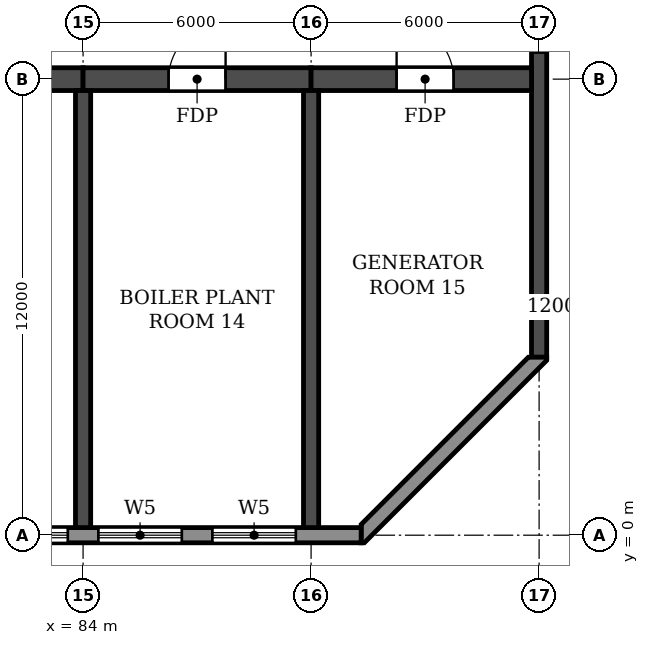
"""IFC4 building model, lengths in metres.
Left out: names, types, materials, properties, quantities, classifications, styles, units other than length and angle.
Written with IfcOpenShell. Run it as: python <this file> out.ifc"""

import sys

from ifc_helpers import new_model, si_unit, direction, frame, frame_2d, origin, place, context, subcontext, project, spatial, polyline, rectangle, outline, extrude, element, fill, save


model = new_model("IFC4")
c1 = context("Model", 3, precision=1e-05, world=origin(), true_north=direction((0.0, 1.0)))
c2 = subcontext(c1, "Body", "Model", "MODEL_VIEW")
j1 = project(units=[si_unit("LENGTHUNIT", "METRE"), si_unit("PLANEANGLEUNIT", "RADIAN")], contexts=[c1])
p1 = place(None, origin())
s1 = spatial("IfcSite", under=j1, at=p1, CompositionType="ELEMENT")
p2 = place(p1, origin())
s2 = spatial("IfcBuilding", under=s1, at=p2, CompositionType="ELEMENT")
p3 = place(p2, frame((0.0, 0.0, 66.3)))
s3 = spatial("IfcBuildingStorey", under=s2, at=p3, CompositionType="ELEMENT", Elevation=66.3)
for number, where, z_axis, x_axis in (
    (1, (84.0, 0.2, 0.0), (0.0, 0.0, 1.0), (0.0, 1.0, 0.0)),
    (2, (90.0, 0.2, 0.0), (0.0, 0.0, 1.0), (0.0, 1.0, 0.0)),
):
    element("IfcWall", number, at=place(p3, frame(where, z_axis=z_axis, x_axis=x_axis)), inside=s3, PredefinedType="SHEAR", context=c2, shape_type="SweptSolid", body=[
        extrude(rectangle(XDim=11.5, YDim=0.4, at=frame_2d((5.75, 0.0))), origin(), (0.0, 0.0, 1.0), 6.36),
    ])
p4 = place(p3, frame((96.0, 4.683, 0.0), z_axis=(0.0, 0.0, 1.0), x_axis=(0.0, 1.0, 0.0)))
e3 = element("IfcWall", 3, at=p4, inside=s3, PredefinedType="SHEAR", context=c2, shape_type="SweptSolid", body=[
    extrude(rectangle(XDim=35.434, YDim=0.4, at=frame_2d((17.717, 0.0))), origin(), (0.0, 0.0, 1.0), 6.36),
])
p5 = place(p4, frame((23.817, 0.0, 0.9)))
e4 = element("IfcOpeningElement", 4, at=p5, cuts=e3, PredefinedType="OPENING", context=c2, shape_type="SweptSolid", body=[
    extrude(rectangle(XDim=1.2, YDim=1.5, at=frame_2d((0.6, 0.75))), frame((0.0, 0.21, 0.0), z_axis=(0.0, -1.0, 0.0), x_axis=(1.0, 0.0, 0.0)), (0.0, 0.0, 1.0), 0.42),
])
p6 = place(p4, frame((8.017, 0.0, 0.9)))
e5 = element("IfcOpeningElement", 5, at=p6, cuts=e3, PredefinedType="OPENING", context=c2, shape_type="SweptSolid", body=[
    extrude(rectangle(XDim=1.2, YDim=1.5, at=frame_2d((0.6, 0.75))), frame((0.0, 0.21, 0.0), z_axis=(0.0, -1.0, 0.0), x_axis=(1.0, 0.0, 0.0)), (0.0, 0.0, 1.0), 0.42),
])
p7 = place(p4, frame((13.317, 0.0, 0.9)))
e6 = element("IfcOpeningElement", 6, at=p7, cuts=e3, PredefinedType="OPENING", context=c2, shape_type="SweptSolid", body=[
    extrude(rectangle(XDim=1.2, YDim=1.5, at=frame_2d((0.6, 0.75))), frame((0.0, 0.21, 0.0), z_axis=(0.0, -1.0, 0.0), x_axis=(1.0, 0.0, 0.0)), (0.0, 0.0, 1.0), 0.42),
])
p8 = place(p3, frame((78.0, 12.0, 0.0), z_axis=(0.0, 0.0, 1.0), x_axis=(1.0, 0.0, 0.0)))
e7 = element("IfcWall", 7, at=p8, inside=s3, PredefinedType="SHEAR", context=c2, shape_type="SweptSolid", body=[
    extrude(rectangle(XDim=6.0, YDim=0.6, at=frame_2d((3.0, 0.0))), origin(), (0.0, 0.0, 1.0), 6.36),
])
p9 = place(p8, frame((2.25, 0.0, 0.0)))
e8 = element("IfcOpeningElement", 8, at=p9, cuts=e7, PredefinedType="OPENING", context=c2, shape_type="SweptSolid", body=[
    extrude(rectangle(XDim=1.5, YDim=2.1, at=frame_2d((0.75, 1.05))), frame((0.0, 0.31, 0.0), z_axis=(0.0, -1.0, 0.0), x_axis=(1.0, 0.0, 0.0)), (0.0, 0.0, 1.0), 0.62),
])
p10 = place(p3, frame((84.0, 12.0, 0.0), z_axis=(0.0, 0.0, 1.0), x_axis=(1.0, 0.0, 0.0)))
e9 = element("IfcWall", 9, at=p10, inside=s3, PredefinedType="SHEAR", context=c2, shape_type="SweptSolid", body=[
    extrude(rectangle(XDim=6.0, YDim=0.6, at=frame_2d((3.0, 0.0))), origin(), (0.0, 0.0, 1.0), 6.36),
])
p11 = place(p10, frame((2.25, 0.0, 0.0)))
e10 = element("IfcOpeningElement", 10, at=p11, cuts=e9, PredefinedType="OPENING", context=c2, shape_type="SweptSolid", body=[
    extrude(rectangle(XDim=1.5, YDim=2.1, at=frame_2d((0.75, 1.05))), frame((0.0, 0.31, 0.0), z_axis=(0.0, -1.0, 0.0), x_axis=(1.0, 0.0, 0.0)), (0.0, 0.0, 1.0), 0.62),
])
p12 = place(p3, frame((90.0, 12.0, 0.0), z_axis=(0.0, 0.0, 1.0), x_axis=(1.0, 0.0, 0.0)))
e11 = element("IfcWall", 11, at=p12, inside=s3, PredefinedType="SHEAR", context=c2, shape_type="SweptSolid", body=[
    extrude(rectangle(XDim=5.8, YDim=0.6, at=frame_2d((2.9, 0.0))), origin(), (0.0, 0.0, 1.0), 6.36),
])
p13 = place(p12, frame((2.25, 0.0, 0.0)))
e12 = element("IfcOpeningElement", 12, at=p13, cuts=e11, PredefinedType="OPENING", context=c2, shape_type="SweptSolid", body=[
    extrude(rectangle(XDim=1.5, YDim=2.1, at=frame_2d((0.75, 1.05))), frame((0.0, 0.31, 0.0), z_axis=(0.0, -1.0, 0.0), x_axis=(1.0, 0.0, 0.0)), (0.0, 0.0, 1.0), 0.62),
])
p14 = place(p3, frame((10.683, 0.0, 0.0), z_axis=(0.0, 0.0, 1.0), x_axis=(1.0, 0.0, 0.0)))
e13 = element("IfcWall", 13, at=p14, inside=s3, PredefinedType="STANDARD", context=c2, shape_type="SweptSolid", body=[
    extrude(rectangle(XDim=80.634, YDim=0.4, at=frame_2d((40.317, 0.0))), origin(), (0.0, 0.0, 1.0), 6.36),
])
p15 = place(p14, frame((1.717, 0.0, 0.6)))
e14 = element("IfcOpeningElement", 14, at=p15, cuts=e13, PredefinedType="OPENING", context=c2, shape_type="SweptSolid", body=[
    extrude(rectangle(XDim=2.2, YDim=2.4, at=frame_2d((1.1, 1.2))), frame((0.0, 0.21, 0.0), z_axis=(0.0, -1.0, 0.0), x_axis=(1.0, 0.0, 0.0)), (0.0, 0.0, 1.0), 0.42),
])
p16 = place(p14, frame((4.717, 0.0, 0.6)))
e15 = element("IfcOpeningElement", 15, at=p16, cuts=e13, PredefinedType="OPENING", context=c2, shape_type="SweptSolid", body=[
    extrude(rectangle(XDim=2.2, YDim=2.4, at=frame_2d((1.1, 1.2))), frame((0.0, 0.21, 0.0), z_axis=(0.0, -1.0, 0.0), x_axis=(1.0, 0.0, 0.0)), (0.0, 0.0, 1.0), 0.42),
])
p17 = place(p14, frame((7.717, 0.0, 0.6)))
e16 = element("IfcOpeningElement", 16, at=p17, cuts=e13, PredefinedType="OPENING", context=c2, shape_type="SweptSolid", body=[
    extrude(rectangle(XDim=2.2, YDim=2.4, at=frame_2d((1.1, 1.2))), frame((0.0, 0.21, 0.0), z_axis=(0.0, -1.0, 0.0), x_axis=(1.0, 0.0, 0.0)), (0.0, 0.0, 1.0), 0.42),
])
p18 = place(p14, frame((10.717, 0.0, 0.6)))
e17 = element("IfcOpeningElement", 17, at=p18, cuts=e13, PredefinedType="OPENING", context=c2, shape_type="SweptSolid", body=[
    extrude(rectangle(XDim=2.2, YDim=2.4, at=frame_2d((1.1, 1.2))), frame((0.0, 0.21, 0.0), z_axis=(0.0, -1.0, 0.0), x_axis=(1.0, 0.0, 0.0)), (0.0, 0.0, 1.0), 0.42),
])
p19 = place(p14, frame((13.717, 0.0, 0.6)))
e18 = element("IfcOpeningElement", 18, at=p19, cuts=e13, PredefinedType="OPENING", context=c2, shape_type="SweptSolid", body=[
    extrude(rectangle(XDim=2.2, YDim=2.4, at=frame_2d((1.1, 1.2))), frame((0.0, 0.21, 0.0), z_axis=(0.0, -1.0, 0.0), x_axis=(1.0, 0.0, 0.0)), (0.0, 0.0, 1.0), 0.42),
])
p20 = place(p14, frame((16.717, 0.0, 0.6)))
e19 = element("IfcOpeningElement", 19, at=p20, cuts=e13, PredefinedType="OPENING", context=c2, shape_type="SweptSolid", body=[
    extrude(rectangle(XDim=2.2, YDim=2.4, at=frame_2d((1.1, 1.2))), frame((0.0, 0.21, 0.0), z_axis=(0.0, -1.0, 0.0), x_axis=(1.0, 0.0, 0.0)), (0.0, 0.0, 1.0), 0.42),
])
p21 = place(p14, frame((19.717, 0.0, 0.6)))
e20 = element("IfcOpeningElement", 20, at=p21, cuts=e13, PredefinedType="OPENING", context=c2, shape_type="SweptSolid", body=[
    extrude(rectangle(XDim=2.2, YDim=2.4, at=frame_2d((1.1, 1.2))), frame((0.0, 0.21, 0.0), z_axis=(0.0, -1.0, 0.0), x_axis=(1.0, 0.0, 0.0)), (0.0, 0.0, 1.0), 0.42),
])
p22 = place(p14, frame((22.717, 0.0, 0.6)))
e21 = element("IfcOpeningElement", 21, at=p22, cuts=e13, PredefinedType="OPENING", context=c2, shape_type="SweptSolid", body=[
    extrude(rectangle(XDim=2.2, YDim=2.4, at=frame_2d((1.1, 1.2))), frame((0.0, 0.21, 0.0), z_axis=(0.0, -1.0, 0.0), x_axis=(1.0, 0.0, 0.0)), (0.0, 0.0, 1.0), 0.42),
])
p23 = place(p14, frame((25.717, 0.0, 0.6)))
e22 = element("IfcOpeningElement", 22, at=p23, cuts=e13, PredefinedType="OPENING", context=c2, shape_type="SweptSolid", body=[
    extrude(rectangle(XDim=2.2, YDim=2.4, at=frame_2d((1.1, 1.2))), frame((0.0, 0.21, 0.0), z_axis=(0.0, -1.0, 0.0), x_axis=(1.0, 0.0, 0.0)), (0.0, 0.0, 1.0), 0.42),
])
p24 = place(p14, frame((28.717, 0.0, 0.6)))
e23 = element("IfcOpeningElement", 23, at=p24, cuts=e13, PredefinedType="OPENING", context=c2, shape_type="SweptSolid", body=[
    extrude(rectangle(XDim=2.2, YDim=2.4, at=frame_2d((1.1, 1.2))), frame((0.0, 0.21, 0.0), z_axis=(0.0, -1.0, 0.0), x_axis=(1.0, 0.0, 0.0)), (0.0, 0.0, 1.0), 0.42),
])
p25 = place(p14, frame((31.717, 0.0, 0.6)))
e24 = element("IfcOpeningElement", 24, at=p25, cuts=e13, PredefinedType="OPENING", context=c2, shape_type="SweptSolid", body=[
    extrude(rectangle(XDim=2.2, YDim=2.4, at=frame_2d((1.1, 1.2))), frame((0.0, 0.21, 0.0), z_axis=(0.0, -1.0, 0.0), x_axis=(1.0, 0.0, 0.0)), (0.0, 0.0, 1.0), 0.42),
])
p26 = place(p14, frame((34.717, 0.0, 0.6)))
e25 = element("IfcOpeningElement", 25, at=p26, cuts=e13, PredefinedType="OPENING", context=c2, shape_type="SweptSolid", body=[
    extrude(rectangle(XDim=2.2, YDim=2.4, at=frame_2d((1.1, 1.2))), frame((0.0, 0.21, 0.0), z_axis=(0.0, -1.0, 0.0), x_axis=(1.0, 0.0, 0.0)), (0.0, 0.0, 1.0), 0.42),
])
p27 = place(p14, frame((37.717, 0.0, 0.6)))
e26 = element("IfcOpeningElement", 26, at=p27, cuts=e13, PredefinedType="OPENING", context=c2, shape_type="SweptSolid", body=[
    extrude(rectangle(XDim=2.2, YDim=2.4, at=frame_2d((1.1, 1.2))), frame((0.0, 0.21, 0.0), z_axis=(0.0, -1.0, 0.0), x_axis=(1.0, 0.0, 0.0)), (0.0, 0.0, 1.0), 0.42),
])
p28 = place(p14, frame((40.717, 0.0, 0.6)))
e27 = element("IfcOpeningElement", 27, at=p28, cuts=e13, PredefinedType="OPENING", context=c2, shape_type="SweptSolid", body=[
    extrude(rectangle(XDim=2.2, YDim=2.4, at=frame_2d((1.1, 1.2))), frame((0.0, 0.21, 0.0), z_axis=(0.0, -1.0, 0.0), x_axis=(1.0, 0.0, 0.0)), (0.0, 0.0, 1.0), 0.42),
])
p29 = place(p14, frame((43.717, 0.0, 0.6)))
e28 = element("IfcOpeningElement", 28, at=p29, cuts=e13, PredefinedType="OPENING", context=c2, shape_type="SweptSolid", body=[
    extrude(rectangle(XDim=2.2, YDim=2.4, at=frame_2d((1.1, 1.2))), frame((0.0, 0.21, 0.0), z_axis=(0.0, -1.0, 0.0), x_axis=(1.0, 0.0, 0.0)), (0.0, 0.0, 1.0), 0.42),
])
p30 = place(p14, frame((46.717, 0.0, 0.6)))
e29 = element("IfcOpeningElement", 29, at=p30, cuts=e13, PredefinedType="OPENING", context=c2, shape_type="SweptSolid", body=[
    extrude(rectangle(XDim=2.2, YDim=2.4, at=frame_2d((1.1, 1.2))), frame((0.0, 0.21, 0.0), z_axis=(0.0, -1.0, 0.0), x_axis=(1.0, 0.0, 0.0)), (0.0, 0.0, 1.0), 0.42),
])
p31 = place(p14, frame((49.717, 0.0, 0.6)))
e30 = element("IfcOpeningElement", 30, at=p31, cuts=e13, PredefinedType="OPENING", context=c2, shape_type="SweptSolid", body=[
    extrude(rectangle(XDim=2.2, YDim=2.4, at=frame_2d((1.1, 1.2))), frame((0.0, 0.21, 0.0), z_axis=(0.0, -1.0, 0.0), x_axis=(1.0, 0.0, 0.0)), (0.0, 0.0, 1.0), 0.42),
])
p32 = place(p14, frame((52.717, 0.0, 0.6)))
e31 = element("IfcOpeningElement", 31, at=p32, cuts=e13, PredefinedType="OPENING", context=c2, shape_type="SweptSolid", body=[
    extrude(rectangle(XDim=2.2, YDim=2.4, at=frame_2d((1.1, 1.2))), frame((0.0, 0.21, 0.0), z_axis=(0.0, -1.0, 0.0), x_axis=(1.0, 0.0, 0.0)), (0.0, 0.0, 1.0), 0.42),
])
p33 = place(p14, frame((55.717, 0.0, 0.6)))
e32 = element("IfcOpeningElement", 32, at=p33, cuts=e13, PredefinedType="OPENING", context=c2, shape_type="SweptSolid", body=[
    extrude(rectangle(XDim=2.2, YDim=2.4, at=frame_2d((1.1, 1.2))), frame((0.0, 0.21, 0.0), z_axis=(0.0, -1.0, 0.0), x_axis=(1.0, 0.0, 0.0)), (0.0, 0.0, 1.0), 0.42),
])
p34 = place(p14, frame((58.717, 0.0, 0.6)))
e33 = element("IfcOpeningElement", 33, at=p34, cuts=e13, PredefinedType="OPENING", context=c2, shape_type="SweptSolid", body=[
    extrude(rectangle(XDim=2.2, YDim=2.4, at=frame_2d((1.1, 1.2))), frame((0.0, 0.21, 0.0), z_axis=(0.0, -1.0, 0.0), x_axis=(1.0, 0.0, 0.0)), (0.0, 0.0, 1.0), 0.42),
])
p35 = place(p14, frame((61.717, 0.0, 0.6)))
e34 = element("IfcOpeningElement", 34, at=p35, cuts=e13, PredefinedType="OPENING", context=c2, shape_type="SweptSolid", body=[
    extrude(rectangle(XDim=2.2, YDim=2.4, at=frame_2d((1.1, 1.2))), frame((0.0, 0.21, 0.0), z_axis=(0.0, -1.0, 0.0), x_axis=(1.0, 0.0, 0.0)), (0.0, 0.0, 1.0), 0.42),
])
p36 = place(p14, frame((64.717, 0.0, 0.6)))
e35 = element("IfcOpeningElement", 35, at=p36, cuts=e13, PredefinedType="OPENING", context=c2, shape_type="SweptSolid", body=[
    extrude(rectangle(XDim=2.2, YDim=2.4, at=frame_2d((1.1, 1.2))), frame((0.0, 0.21, 0.0), z_axis=(0.0, -1.0, 0.0), x_axis=(1.0, 0.0, 0.0)), (0.0, 0.0, 1.0), 0.42),
])
p37 = place(p14, frame((67.717, 0.0, 0.6)))
e36 = element("IfcOpeningElement", 36, at=p37, cuts=e13, PredefinedType="OPENING", context=c2, shape_type="SweptSolid", body=[
    extrude(rectangle(XDim=2.2, YDim=2.4, at=frame_2d((1.1, 1.2))), frame((0.0, 0.21, 0.0), z_axis=(0.0, -1.0, 0.0), x_axis=(1.0, 0.0, 0.0)), (0.0, 0.0, 1.0), 0.42),
])
p38 = place(p14, frame((70.717, 0.0, 0.6)))
e37 = element("IfcOpeningElement", 37, at=p38, cuts=e13, PredefinedType="OPENING", context=c2, shape_type="SweptSolid", body=[
    extrude(rectangle(XDim=2.2, YDim=2.4, at=frame_2d((1.1, 1.2))), frame((0.0, 0.21, 0.0), z_axis=(0.0, -1.0, 0.0), x_axis=(1.0, 0.0, 0.0)), (0.0, 0.0, 1.0), 0.42),
])
p39 = place(p14, frame((73.717, 0.0, 0.6)))
e38 = element("IfcOpeningElement", 38, at=p39, cuts=e13, PredefinedType="OPENING", context=c2, shape_type="SweptSolid", body=[
    extrude(rectangle(XDim=2.2, YDim=2.4, at=frame_2d((1.1, 1.2))), frame((0.0, 0.21, 0.0), z_axis=(0.0, -1.0, 0.0), x_axis=(1.0, 0.0, 0.0)), (0.0, 0.0, 1.0), 0.42),
])
p40 = place(p14, frame((76.717, 0.0, 0.6)))
e39 = element("IfcOpeningElement", 39, at=p40, cuts=e13, PredefinedType="OPENING", context=c2, shape_type="SweptSolid", body=[
    extrude(rectangle(XDim=2.2, YDim=2.4, at=frame_2d((1.1, 1.2))), frame((0.0, 0.21, 0.0), z_axis=(0.0, -1.0, 0.0), x_axis=(1.0, 0.0, 0.0)), (0.0, 0.0, 1.0), 0.42),
])
p41 = place(p3, origin())
e40 = element("IfcWall", 40, at=p41, inside=s3, PredefinedType="STANDARD", context=c2, shape_type="SweptSolid", body=[
    extrude(outline(polyline([(91.317, -0.2), (91.4, -0.2), (96.2, 4.6), (96.2, 4.683), (95.717, 4.683), (91.317, 0.283), (91.317, -0.2)])), origin(), (0.0, 0.0, 1.0), 6.36),
])
p42 = place(p38, origin())
e41 = element("IfcWindow", 41, at=p42, inside=s3, PartitioningType="TRIPLE_PANEL_HORIZONTAL", PredefinedType="WINDOW", context=c2, shape_type="SweptSolid", body=[
    extrude(rectangle(XDim=2.2, YDim=2.4, at=frame_2d((1.1, 1.2))), frame((0.0, 0.03, 0.0), z_axis=(0.0, -1.0, 0.0), x_axis=(1.0, 0.0, 0.0)), (0.0, 0.0, 1.0), 0.06),
])
fill(e37, e41)
p43 = place(p39, origin())
e42 = element("IfcWindow", 42, at=p43, inside=s3, PartitioningType="TRIPLE_PANEL_HORIZONTAL", PredefinedType="WINDOW", context=c2, shape_type="SweptSolid", body=[
    extrude(rectangle(XDim=2.2, YDim=2.4, at=frame_2d((1.1, 1.2))), frame((0.0, 0.03, 0.0), z_axis=(0.0, -1.0, 0.0), x_axis=(1.0, 0.0, 0.0)), (0.0, 0.0, 1.0), 0.06),
])
fill(e38, e42)
p44 = place(p40, origin())
e43 = element("IfcWindow", 43, at=p44, inside=s3, PartitioningType="TRIPLE_PANEL_HORIZONTAL", PredefinedType="WINDOW", context=c2, shape_type="SweptSolid", body=[
    extrude(rectangle(XDim=2.2, YDim=2.4, at=frame_2d((1.1, 1.2))), frame((0.0, 0.03, 0.0), z_axis=(0.0, -1.0, 0.0), x_axis=(1.0, 0.0, 0.0)), (0.0, 0.0, 1.0), 0.06),
])
fill(e39, e43)
p45 = place(p11, origin())
e44 = element("IfcDoor", 44, at=p45, inside=s3, OperationType="DOUBLE_DOOR_SINGLE_SWING", PredefinedType="DOOR", context=c2, shape_type="SweptSolid", body=[
    extrude(rectangle(XDim=1.5, YDim=2.1, at=frame_2d((0.75, 1.05))), frame((0.0, 0.025, 0.0), z_axis=(0.0, -1.0, 0.0), x_axis=(1.0, 0.0, 0.0)), (0.0, 0.0, 1.0), 0.05),
])
fill(e10, e44)
p46 = place(p13, origin())
e45 = element("IfcDoor", 45, at=p46, inside=s3, OperationType="DOUBLE_DOOR_SINGLE_SWING", PredefinedType="DOOR", context=c2, shape_type="SweptSolid", body=[
    extrude(rectangle(XDim=1.5, YDim=2.1, at=frame_2d((0.75, 1.05))), frame((0.0, 0.025, 0.0), z_axis=(0.0, -1.0, 0.0), x_axis=(1.0, 0.0, 0.0)), (0.0, 0.0, 1.0), 0.05),
])
fill(e12, e45)
save(model, sys.argv[1])
